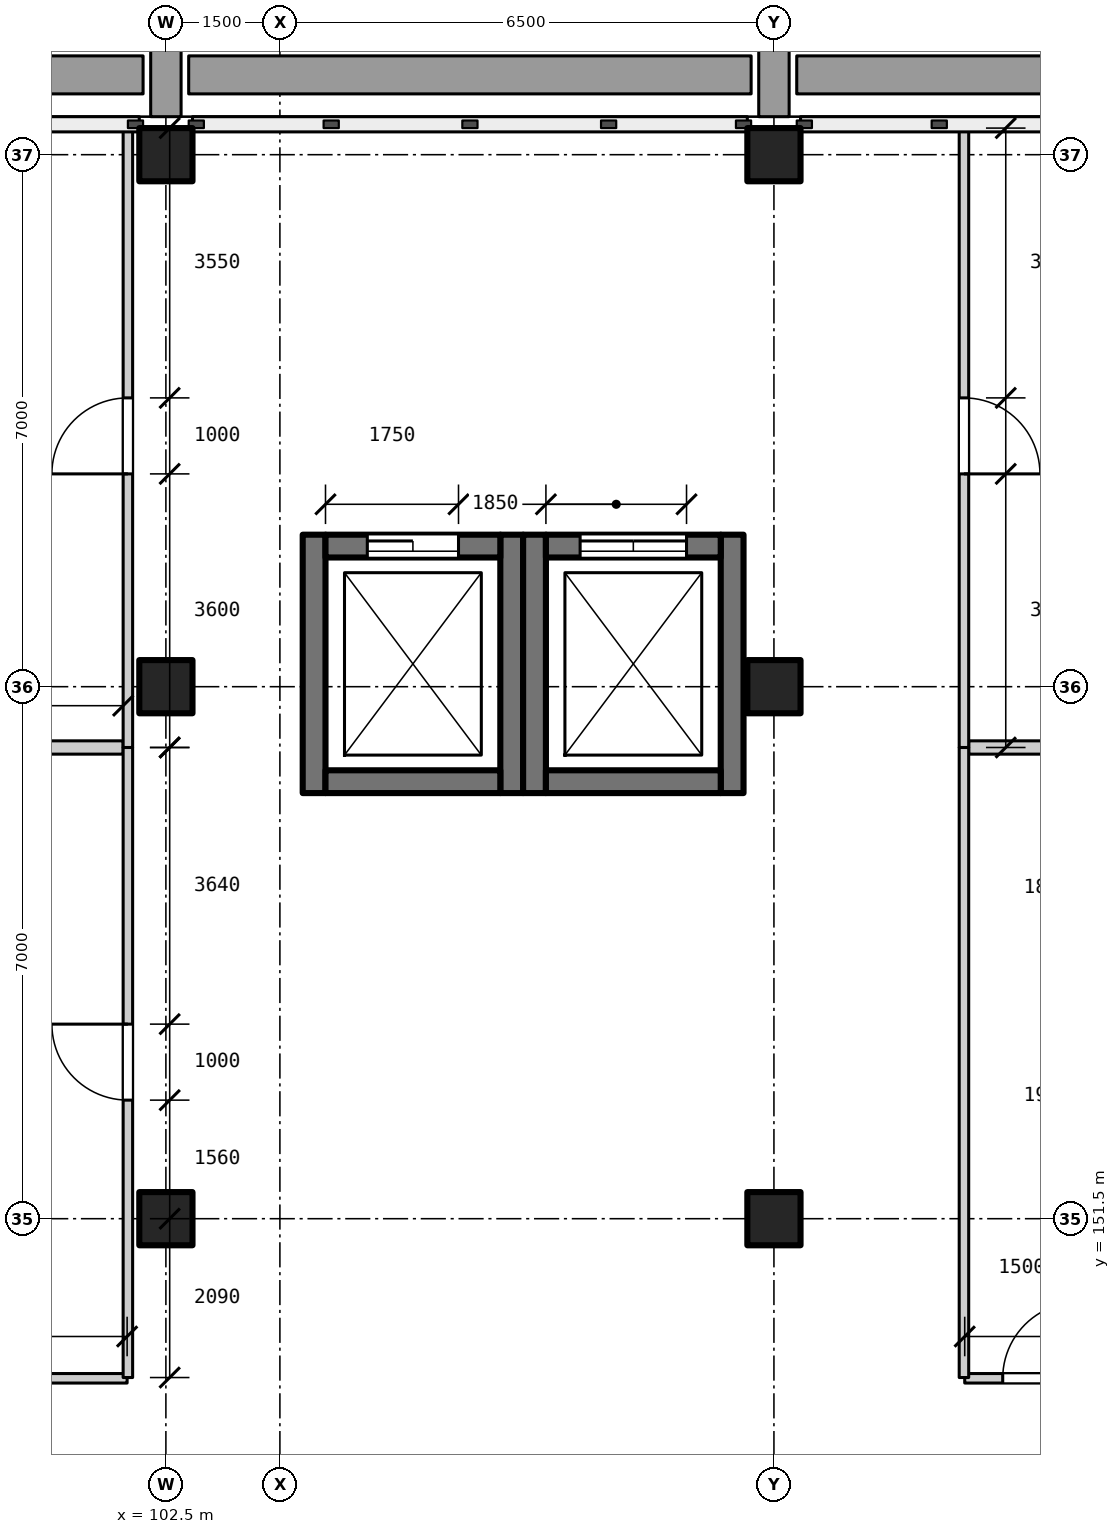
"""IFC4 building model, lengths in metres.
Left out: names, types, materials, properties, quantities, classifications, styles, units other than length and angle.
Written with IfcOpenShell. Run it as: python <this file> out.ifc"""

import sys

from ifc_helpers import new_model, si_unit, direction, frame, frame_2d, origin, origin_2d, place, context, subcontext, project, spatial, rectangle, extrude, element, fill, save


model = new_model("IFC4")
c1 = context("Model", 3, precision=1e-05, world=origin(), true_north=direction((0.0, 1.0)))
c2 = subcontext(c1, "Body", "Model", "MODEL_VIEW")
j1 = project(units=[si_unit("LENGTHUNIT", "METRE"), si_unit("PLANEANGLEUNIT", "RADIAN")], contexts=[c1])
p1 = place(None, origin())
s1 = spatial("IfcSite", under=j1, at=p1, CompositionType="ELEMENT")
p2 = place(p1, origin())
s2 = spatial("IfcBuilding", under=s1, at=p2, CompositionType="ELEMENT")
p3 = place(p2, frame((0.0, 0.0, 6.0)))
s3 = spatial("IfcBuildingStorey", under=s2, at=p3, CompositionType="ELEMENT", Elevation=6.0)
for number, where, z_axis, x_axis in (
    (1, (102.5, 151.5, 0.0), (0.0, 0.0, 1.0), (1.0, 0.0, 0.0)),
    (2, (102.5, 158.5, 0.0), (0.0, 0.0, 1.0), (1.0, 0.0, 0.0)),
    (3, (102.5, 165.5, 0.0), (0.0, 0.0, 1.0), (1.0, 0.0, 0.0)),
    (4, (110.5, 151.5, 0.0), (0.0, 0.0, 1.0), (1.0, 0.0, 0.0)),
    (5, (110.5, 158.5, 0.0), (0.0, 0.0, 1.0), (1.0, 0.0, 0.0)),
    (6, (110.5, 165.5, 0.0), (0.0, 0.0, 1.0), (1.0, 0.0, 0.0)),
):
    element("IfcColumn", number, at=place(p3, frame(where, z_axis=z_axis, x_axis=x_axis)), inside=s3, PredefinedType="COLUMN", context=c2, shape_type="SweptSolid", body=[
        extrude(rectangle(XDim=0.7, YDim=0.7, at=origin_2d()), origin(), (0.0, 0.0, 1.0), 4.2),
    ])
for number, where, z_axis, x_axis in (
    (7, (104.45, 157.1, 0.0), (0.0, 0.0, 1.0), (0.0, 1.0, 0.0)),
    (8, (107.05, 157.1, 0.0), (0.0, 0.0, 1.0), (0.0, 1.0, 0.0)),
):
    element("IfcWall", number, at=place(p3, frame(where, z_axis=z_axis, x_axis=x_axis)), inside=s3, PredefinedType="SHEAR", context=c2, shape_type="SweptSolid", body=[
        extrude(rectangle(XDim=3.4, YDim=0.3, at=frame_2d((1.7, 0.0))), origin(), (0.0, 0.0, 1.0), 4.2),
    ])
p4 = place(p3, frame((104.6, 157.25, 0.0), z_axis=(0.0, 0.0, 1.0), x_axis=(1.0, 0.0, 0.0)))
e9 = element("IfcWall", 9, at=p4, inside=s3, PredefinedType="SHEAR", context=c2, shape_type="SweptSolid", body=[
    extrude(rectangle(XDim=2.3, YDim=0.3, at=frame_2d((1.15, 0.0))), origin(), (0.0, 0.0, 1.0), 4.2),
])
p5 = place(p3, frame((104.6, 160.35, 0.0), z_axis=(0.0, 0.0, 1.0), x_axis=(1.0, 0.0, 0.0)))
e10 = element("IfcWall", 10, at=p5, inside=s3, PredefinedType="SHEAR", context=c2, shape_type="SweptSolid", body=[
    extrude(rectangle(XDim=2.3, YDim=0.3, at=frame_2d((1.15, 0.0))), origin(), (0.0, 0.0, 1.0), 4.2),
])
p6 = place(p5, frame((0.55, 0.0, 0.0)))
e11 = element("IfcOpeningElement", 11, at=p6, cuts=e10, PredefinedType="OPENING", context=c2, shape_type="SweptSolid", body=[
    extrude(rectangle(XDim=1.2, YDim=2.1, at=frame_2d((0.6, 1.05))), frame((0.0, 0.16, 0.0), z_axis=(0.0, -1.0, 0.0), x_axis=(1.0, 0.0, 0.0)), (0.0, 0.0, 1.0), 0.32),
])
for number, where, z_axis, x_axis in (
    (12, (107.35, 157.1, 0.0), (0.0, 0.0, 1.0), (0.0, 1.0, 0.0)),
    (13, (109.95, 157.1, 0.0), (0.0, 0.0, 1.0), (0.0, 1.0, 0.0)),
):
    element("IfcWall", number, at=place(p3, frame(where, z_axis=z_axis, x_axis=x_axis)), inside=s3, PredefinedType="SHEAR", context=c2, shape_type="SweptSolid", body=[
        extrude(rectangle(XDim=3.4, YDim=0.3, at=frame_2d((1.7, 0.0))), origin(), (0.0, 0.0, 1.0), 4.2),
    ])
p7 = place(p3, frame((107.5, 157.25, 0.0), z_axis=(0.0, 0.0, 1.0), x_axis=(1.0, 0.0, 0.0)))
e14 = element("IfcWall", 14, at=p7, inside=s3, PredefinedType="SHEAR", context=c2, shape_type="SweptSolid", body=[
    extrude(rectangle(XDim=2.3, YDim=0.3, at=frame_2d((1.15, 0.0))), origin(), (0.0, 0.0, 1.0), 4.2),
])
p8 = place(p3, frame((107.5, 160.35, 0.0), z_axis=(0.0, 0.0, 1.0), x_axis=(1.0, 0.0, 0.0)))
e15 = element("IfcWall", 15, at=p8, inside=s3, PredefinedType="SHEAR", context=c2, shape_type="SweptSolid", body=[
    extrude(rectangle(XDim=2.3, YDim=0.3, at=frame_2d((1.15, 0.0))), origin(), (0.0, 0.0, 1.0), 4.2),
])
p9 = place(p8, frame((0.45, 0.0, 0.0)))
e16 = element("IfcOpeningElement", 16, at=p9, cuts=e15, PredefinedType="OPENING", context=c2, shape_type="SweptSolid", body=[
    extrude(rectangle(XDim=1.4, YDim=2.1, at=frame_2d((0.7, 1.05))), frame((0.0, 0.16, 0.0), z_axis=(0.0, -1.0, 0.0), x_axis=(1.0, 0.0, 0.0)), (0.0, 0.0, 1.0), 0.32),
])
p10 = place(p3, frame((89.61, 149.4, 0.0), z_axis=(0.0, 0.0, 1.0), x_axis=(1.0, 0.0, 0.0)))
e17 = element("IfcWall", 17, at=p10, inside=s3, PredefinedType="PARTITIONING", context=c2, shape_type="SweptSolid", body=[
    extrude(rectangle(XDim=12.38, YDim=0.125, at=frame_2d((6.19, 0.0))), origin(), (0.0, 0.0, 1.0), 3.9),
])
p11 = place(p10, frame((5.7, 0.0, 0.0)))
e18 = element("IfcOpeningElement", 18, at=p11, cuts=e17, PredefinedType="OPENING", context=c2, shape_type="SweptSolid", body=[
    extrude(rectangle(XDim=1.0, YDim=2.1, at=frame_2d((0.5, 1.05))), frame((0.0, 0.073, 0.0), z_axis=(0.0, -1.0, 0.0), x_axis=(1.0, 0.0, 0.0)), (0.0, 0.0, 1.0), 0.145),
])
p12 = place(p3, frame((113.01, 149.4, 0.0), z_axis=(0.0, 0.0, 1.0), x_axis=(1.0, 0.0, 0.0)))
e19 = element("IfcWall", 19, at=p12, inside=s3, PredefinedType="PARTITIONING", context=c2, shape_type="SweptSolid", body=[
    extrude(rectangle(XDim=1.99, YDim=0.125, at=frame_2d((0.995, 0.0))), origin(), (0.0, 0.0, 1.0), 3.9),
])
p13 = place(p12, frame((0.5, 0.0, 0.0)))
e20 = element("IfcOpeningElement", 20, at=p13, cuts=e19, PredefinedType="OPENING", context=c2, shape_type="SweptSolid", body=[
    extrude(rectangle(XDim=1.0, YDim=2.1, at=frame_2d((0.5, 1.05))), frame((0.0, 0.073, 0.0), z_axis=(0.0, -1.0, 0.0), x_axis=(1.0, 0.0, 0.0)), (0.0, 0.0, 1.0), 0.145),
])
p14 = place(p3, frame((89.663, 157.7, 0.0), z_axis=(0.0, 0.0, 1.0), x_axis=(1.0, 0.0, 0.0)))
e21 = element("IfcWall", 21, at=p14, inside=s3, PredefinedType="PARTITIONING", context=c2, shape_type="SweptSolid", body=[
    extrude(rectangle(XDim=12.275, YDim=0.175, at=frame_2d((6.137, 0.0))), origin(), (0.0, 0.0, 1.0), 3.9),
])
p15 = place(p14, frame((0.1, 0.0, 0.0)))
e22 = element("IfcOpeningElement", 22, at=p15, cuts=e21, PredefinedType="OPENING", context=c2, shape_type="SweptSolid", body=[
    extrude(rectangle(XDim=1.0, YDim=2.1, at=frame_2d((0.5, 1.05))), frame((0.0, 0.097, 0.0), z_axis=(0.0, -1.0, 0.0), x_axis=(1.0, 0.0, 0.0)), (0.0, 0.0, 1.0), 0.195),
])
p16 = place(p3, frame((113.062, 157.7, 0.0), z_axis=(0.0, 0.0, 1.0), x_axis=(1.0, 0.0, 0.0)))
e23 = element("IfcWall", 23, at=p16, inside=s3, PredefinedType="PARTITIONING", context=c2, shape_type="SweptSolid", body=[
    extrude(rectangle(XDim=1.938, YDim=0.175, at=frame_2d((0.969, 0.0))), origin(), (0.0, 0.0, 1.0), 3.9),
])
p17 = place(p3, frame((102.0, 149.41, 0.0), z_axis=(0.0, 0.0, 1.0), x_axis=(0.0, 1.0, 0.0)))
e24 = element("IfcWall", 24, at=p17, inside=s3, PredefinedType="PARTITIONING", context=c2, shape_type="SweptSolid", body=[
    extrude(rectangle(XDim=8.29, YDim=0.125, at=frame_2d((4.145, 0.0))), origin(), (0.0, 0.0, 1.0), 3.9),
])
p18 = place(p17, frame((3.65, 0.0, 0.0)))
e25 = element("IfcOpeningElement", 25, at=p18, cuts=e24, PredefinedType="OPENING", context=c2, shape_type="SweptSolid", body=[
    extrude(rectangle(XDim=1.0, YDim=2.1, at=frame_2d((0.5, 1.05))), frame((0.0, 0.073, 0.0), z_axis=(0.0, -1.0, 0.0), x_axis=(1.0, 0.0, 0.0)), (0.0, 0.0, 1.0), 0.145),
])
p19 = place(p3, frame((102.0, 157.7, 0.0), z_axis=(0.0, 0.0, 1.0), x_axis=(0.0, 1.0, 0.0)))
e26 = element("IfcWall", 26, at=p19, inside=s3, PredefinedType="PARTITIONING", context=c2, shape_type="SweptSolid", body=[
    extrude(rectangle(XDim=8.15, YDim=0.125, at=frame_2d((4.075, 0.0))), origin(), (0.0, 0.0, 1.0), 3.9),
])
p20 = place(p19, frame((3.6, 0.0, 0.0)))
e27 = element("IfcOpeningElement", 27, at=p20, cuts=e26, PredefinedType="OPENING", context=c2, shape_type="SweptSolid", body=[
    extrude(rectangle(XDim=1.0, YDim=2.1, at=frame_2d((0.5, 1.05))), frame((0.0, 0.073, 0.0), z_axis=(0.0, -1.0, 0.0), x_axis=(1.0, 0.0, 0.0)), (0.0, 0.0, 1.0), 0.145),
])
p21 = place(p3, frame((113.0, 149.41, 0.0), z_axis=(0.0, 0.0, 1.0), x_axis=(0.0, 1.0, 0.0)))
e28 = element("IfcWall", 28, at=p21, inside=s3, PredefinedType="PARTITIONING", context=c2, shape_type="SweptSolid", body=[
    extrude(rectangle(XDim=8.29, YDim=0.125, at=frame_2d((4.145, 0.0))), origin(), (0.0, 0.0, 1.0), 3.9),
])
p22 = place(p3, frame((113.0, 157.7, 0.0), z_axis=(0.0, 0.0, 1.0), x_axis=(0.0, 1.0, 0.0)))
e29 = element("IfcWall", 29, at=p22, inside=s3, PredefinedType="PARTITIONING", context=c2, shape_type="SweptSolid", body=[
    extrude(rectangle(XDim=8.15, YDim=0.125, at=frame_2d((4.075, 0.0))), origin(), (0.0, 0.0, 1.0), 3.9),
])
p23 = place(p22, frame((3.6, 0.0, 0.0)))
e30 = element("IfcOpeningElement", 30, at=p23, cuts=e29, PredefinedType="OPENING", context=c2, shape_type="SweptSolid", body=[
    extrude(rectangle(XDim=1.0, YDim=2.1, at=frame_2d((0.5, 1.05))), frame((0.0, 0.073, 0.0), z_axis=(0.0, -1.0, 0.0), x_axis=(1.0, 0.0, 0.0)), (0.0, 0.0, 1.0), 0.145),
])
p24 = place(p13, origin())
e31 = element("IfcDoor", 31, at=p24, inside=s3, OperationType="SINGLE_SWING_RIGHT", PredefinedType="DOOR", context=c2, shape_type="SweptSolid", body=[
    extrude(rectangle(XDim=1.0, YDim=2.1, at=frame_2d((0.5, 1.05))), frame((0.0, 0.025, 0.0), z_axis=(0.0, -1.0, 0.0), x_axis=(1.0, 0.0, 0.0)), (0.0, 0.0, 1.0), 0.05),
])
fill(e20, e31)
p25 = place(p18, origin())
e32 = element("IfcDoor", 32, at=p25, inside=s3, OperationType="SINGLE_SWING_RIGHT", PredefinedType="DOOR", context=c2, shape_type="SweptSolid", body=[
    extrude(rectangle(XDim=1.0, YDim=2.1, at=frame_2d((0.5, 1.05))), frame((0.0, 0.025, 0.0), z_axis=(0.0, -1.0, 0.0), x_axis=(1.0, 0.0, 0.0)), (0.0, 0.0, 1.0), 0.05),
])
fill(e25, e32)
p26 = place(p20, origin())
e33 = element("IfcDoor", 33, at=p26, inside=s3, OperationType="SINGLE_SWING_LEFT", PredefinedType="DOOR", context=c2, shape_type="SweptSolid", body=[
    extrude(rectangle(XDim=1.0, YDim=2.1, at=frame_2d((0.5, 1.05))), frame((0.0, 0.025, 0.0), z_axis=(0.0, -1.0, 0.0), x_axis=(1.0, 0.0, 0.0)), (0.0, 0.0, 1.0), 0.05),
])
fill(e27, e33)
p27 = place(p23, frame((1.0, 0.0, 0.0), z_axis=(0.0, 0.0, 1.0), x_axis=(-1.0, 0.0, 0.0)))
e34 = element("IfcDoor", 34, at=p27, inside=s3, OperationType="SINGLE_SWING_RIGHT", PredefinedType="DOOR", context=c2, shape_type="SweptSolid", body=[
    extrude(rectangle(XDim=1.0, YDim=2.1, at=frame_2d((0.5, 1.05))), frame((0.0, 0.025, 0.0), z_axis=(0.0, -1.0, 0.0), x_axis=(1.0, 0.0, 0.0)), (0.0, 0.0, 1.0), 0.05),
])
fill(e30, e34)
p28 = place(p6, origin())
e35 = element("IfcDoor", 35, at=p28, inside=s3, OperationType="SLIDING_TO_LEFT", PredefinedType="DOOR", context=c2, shape_type="SweptSolid", body=[
    extrude(rectangle(XDim=1.2, YDim=2.1, at=frame_2d((0.6, 1.05))), frame((0.0, 0.025, 0.0), z_axis=(0.0, -1.0, 0.0), x_axis=(1.0, 0.0, 0.0)), (0.0, 0.0, 1.0), 0.05),
])
fill(e11, e35)
p29 = place(p9, origin())
e36 = element("IfcDoor", 36, at=p29, inside=s3, OperationType="DOUBLE_DOOR_SLIDING", PredefinedType="DOOR", context=c2, shape_type="SweptSolid", body=[
    extrude(rectangle(XDim=1.4, YDim=2.1, at=frame_2d((0.7, 1.05))), frame((0.0, 0.025, 0.0), z_axis=(0.0, -1.0, 0.0), x_axis=(1.0, 0.0, 0.0)), (0.0, 0.0, 1.0), 0.05),
])
fill(e16, e36)
save(model, sys.argv[1])
